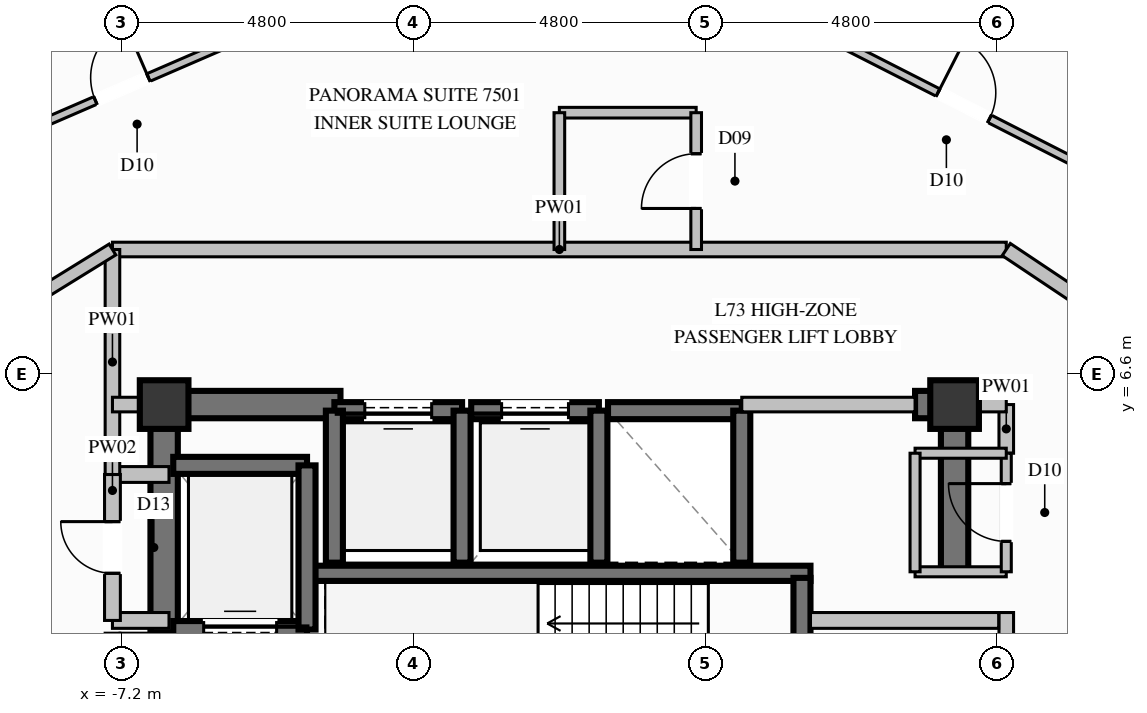
"""IFC4 building model, lengths in metres.
Left out: names, types, materials, properties, quantities, classifications, styles, units other than length and angle.
Written with IfcOpenShell. Run it as: python <this file> out.ifc"""

import sys

from ifc_helpers import new_model, si_unit, direction, frame, frame_2d, origin, origin_2d, place, context, subcontext, project, spatial, rectangle, extrude, element, fill, save


model = new_model("IFC4")
c1 = context("Model", 3, precision=1e-05, world=origin(), true_north=direction((0.0, 1.0)))
c2 = subcontext(c1, "Body", "Model", "MODEL_VIEW")
j1 = project(units=[si_unit("LENGTHUNIT", "METRE"), si_unit("PLANEANGLEUNIT", "RADIAN")], contexts=[c1])
p1 = place(None, origin())
s1 = spatial("IfcSite", under=j1, at=p1, CompositionType="ELEMENT")
p2 = place(p1, origin())
s2 = spatial("IfcBuilding", under=s1, at=p2, CompositionType="ELEMENT")
p3 = place(p2, frame((0.0, 0.0, 282.0)))
s3 = spatial("IfcBuildingStorey", under=s2, at=p3, CompositionType="ELEMENT", Elevation=282.0)
for number, where, z_axis, x_axis in (
    (1, (6.5, 6.1, 0.0), (0.0, 0.0, 1.0), (1.0, 0.0, 0.0)),
    (2, (-6.5, 6.1, 0.0), (0.0, 0.0, 1.0), (1.0, 0.0, 0.0)),
):
    element("IfcColumn", number, at=place(p3, frame(where, z_axis=z_axis, x_axis=x_axis)), inside=s3, PredefinedType="COLUMN", context=c2, shape_type="SweptSolid", body=[
        extrude(rectangle(XDim=0.8, YDim=0.8, at=origin_2d()), origin(), (0.0, 0.0, 1.0), 3.8),
    ])
p4 = place(p3, frame((-4.13, 3.325, 0.0), z_axis=(0.0, 0.0, 1.0), x_axis=(1.0, 0.0, 0.0)))
e3 = element("IfcWall", 3, at=p4, inside=s3, PredefinedType="SOLIDWALL", context=c2, shape_type="SweptSolid", body=[
    extrude(rectangle(XDim=8.26, YDim=0.25, at=frame_2d((4.13, 0.0))), origin(), (0.0, 0.0, 1.0), 3.8),
])
p5 = place(p3, frame((-6.275, 6.1, 0.0), z_axis=(0.0, 0.0, 1.0), x_axis=(1.0, 0.0, 0.0)))
e4 = element("IfcWall", 4, at=p5, inside=s3, PredefinedType="SHEAR", context=c2, shape_type="SweptSolid", body=[
    extrude(rectangle(XDim=2.675, YDim=0.45, at=frame_2d((1.337, 0.0))), origin(), (0.0, 0.0, 1.0), 3.8),
])
p6 = place(p3, frame((5.85, 6.1, 0.0), z_axis=(0.0, 0.0, 1.0), x_axis=(1.0, 0.0, 0.0)))
e5 = element("IfcWall", 5, at=p6, inside=s3, PredefinedType="SHEAR", context=c2, shape_type="SweptSolid", body=[
    extrude(rectangle(XDim=0.425, YDim=0.45, at=frame_2d((0.212, 0.0))), origin(), (0.0, 0.0, 1.0), 3.8),
])
p7 = place(p3, frame((-6.5, 2.35, 0.0), z_axis=(0.0, 0.0, 1.0), x_axis=(0.0, 1.0, 0.0)))
e6 = element("IfcWall", 6, at=p7, inside=s3, PredefinedType="SHEAR", context=c2, shape_type="SweptSolid", body=[
    extrude(rectangle(XDim=3.975, YDim=0.45, at=frame_2d((1.987, 0.0))), origin(), (0.0, 0.0, 1.0), 3.8),
])
p8 = place(p3, frame((6.5, 3.35, 0.0), z_axis=(0.0, 0.0, 1.0), x_axis=(0.0, 1.0, 0.0)))
e7 = element("IfcWall", 7, at=p8, inside=s3, PredefinedType="SHEAR", context=c2, shape_type="SweptSolid", body=[
    extrude(rectangle(XDim=2.975, YDim=0.45, at=frame_2d((1.487, 0.0))), origin(), (0.0, 0.0, 1.0), 3.8),
])
p9 = place(p3, frame((-1.6, 6.0, 0.0), z_axis=(0.0, 0.0, 1.0), x_axis=(-1.0, 0.0, 0.0)))
e8 = element("IfcWall", 8, at=p9, inside=s3, PredefinedType="SOLIDWALL", context=c2, shape_type="SweptSolid", body=[
    extrude(rectangle(XDim=2.1, YDim=0.28, at=frame_2d((1.05, 0.0))), origin(), (0.0, 0.0, 1.0), 3.57),
])
p10 = place(p9, frame((0.5, 0.0, 0.0)))
e9 = element("IfcOpeningElement", 9, at=p10, cuts=e8, PredefinedType="OPENING", context=c2, shape_type="SweptSolid", body=[
    extrude(rectangle(XDim=1.1, YDim=2.2, at=frame_2d((0.55, 1.1))), frame((0.0, 0.15, 0.0), z_axis=(0.0, -1.0, 0.0), x_axis=(1.0, 0.0, 0.0)), (0.0, 0.0, 1.0), 0.3),
])
for number, where, z_axis, x_axis in (
    (10, (-3.7, 6.0, 0.0), (0.0, 0.0, 1.0), (0.0, -1.0, 0.0)),
    (11, (-1.6, 3.5, 0.0), (0.0, 0.0, 1.0), (0.0, 1.0, 0.0)),
):
    element("IfcWall", number, at=place(p3, frame(where, z_axis=z_axis, x_axis=x_axis)), inside=s3, PredefinedType="SOLIDWALL", context=c2, shape_type="SweptSolid", body=[
        extrude(rectangle(XDim=2.5, YDim=0.28, at=frame_2d((1.25, 0.0))), origin(), (0.0, 0.0, 1.0), 3.57),
    ])
p11 = place(p3, frame((0.65, 6.0, 0.0), z_axis=(0.0, 0.0, 1.0), x_axis=(-1.0, 0.0, 0.0)))
e12 = element("IfcWall", 12, at=p11, inside=s3, PredefinedType="SOLIDWALL", context=c2, shape_type="SweptSolid", body=[
    extrude(rectangle(XDim=2.1, YDim=0.28, at=frame_2d((1.05, 0.0))), origin(), (0.0, 0.0, 1.0), 3.57),
])
p12 = place(p11, frame((0.5, 0.0, 0.0)))
e13 = element("IfcOpeningElement", 13, at=p12, cuts=e12, PredefinedType="OPENING", context=c2, shape_type="SweptSolid", body=[
    extrude(rectangle(XDim=1.1, YDim=2.2, at=frame_2d((0.55, 1.1))), frame((0.0, 0.15, 0.0), z_axis=(0.0, -1.0, 0.0), x_axis=(1.0, 0.0, 0.0)), (0.0, 0.0, 1.0), 0.3),
])
p13 = place(p3, frame((0.65, 3.5, 0.0), z_axis=(0.0, 0.0, 1.0), x_axis=(0.0, 1.0, 0.0)))
e14 = element("IfcWall", 14, at=p13, inside=s3, PredefinedType="SOLIDWALL", context=c2, shape_type="SweptSolid", body=[
    extrude(rectangle(XDim=2.5, YDim=0.28, at=frame_2d((1.25, 0.0))), origin(), (0.0, 0.0, 1.0), 3.57),
])
p14 = place(p3, frame((3.0, 6.0, 0.0), z_axis=(0.0, 0.0, 1.0), x_axis=(-1.0, 0.0, 0.0)))
e15 = element("IfcWall", 15, at=p14, inside=s3, PredefinedType="SOLIDWALL", context=c2, shape_type="SweptSolid", body=[
    extrude(rectangle(XDim=2.2, YDim=0.28, at=frame_2d((1.1, 0.0))), origin(), (0.0, 0.0, 1.0), 3.57),
])
p15 = place(p3, frame((3.0, 3.5, 0.0), z_axis=(0.0, 0.0, 1.0), x_axis=(0.0, 1.0, 0.0)))
e16 = element("IfcWall", 16, at=p15, inside=s3, PredefinedType="SOLIDWALL", context=c2, shape_type="SweptSolid", body=[
    extrude(rectangle(XDim=2.5, YDim=0.28, at=frame_2d((1.25, 0.0))), origin(), (0.0, 0.0, 1.0), 3.57),
])
p16 = place(p3, frame((-6.35, 2.4, 0.0), z_axis=(0.0, 0.0, 1.0), x_axis=(1.0, 0.0, 0.0)))
e17 = element("IfcWall", 17, at=p16, inside=s3, PredefinedType="SOLIDWALL", context=c2, shape_type="SweptSolid", body=[
    extrude(rectangle(XDim=2.2, YDim=0.28, at=frame_2d((1.1, 0.0))), origin(), (0.0, 0.0, 1.0), 3.57),
])
p17 = place(p16, frame((0.5, 0.0, 0.0)))
e18 = element("IfcOpeningElement", 18, at=p17, cuts=e17, PredefinedType="OPENING", context=c2, shape_type="SweptSolid", body=[
    extrude(rectangle(XDim=1.2, YDim=2.2, at=frame_2d((0.6, 1.1))), frame((0.0, 0.15, 0.0), z_axis=(0.0, -1.0, 0.0), x_axis=(1.0, 0.0, 0.0)), (0.0, 0.0, 1.0), 0.3),
])
p18 = place(p3, frame((-4.15, 5.1, 0.0), z_axis=(0.0, 0.0, 1.0), x_axis=(-1.0, 0.0, 0.0)))
e19 = element("IfcWall", 19, at=p18, inside=s3, PredefinedType="SOLIDWALL", context=c2, shape_type="SweptSolid", body=[
    extrude(rectangle(XDim=2.2, YDim=0.28, at=frame_2d((1.1, 0.0))), origin(), (0.0, 0.0, 1.0), 3.57),
])
p19 = place(p3, frame((-4.15, 2.4, 0.0), z_axis=(0.0, 0.0, 1.0), x_axis=(0.0, 1.0, 0.0)))
e20 = element("IfcWall", 20, at=p19, inside=s3, PredefinedType="SOLIDWALL", context=c2, shape_type="SweptSolid", body=[
    extrude(rectangle(XDim=2.7, YDim=0.28, at=frame_2d((1.35, 0.0))), origin(), (0.0, 0.0, 1.0), 3.57),
])
p20 = place(p3, frame((3.99, -2.21, 0.0), z_axis=(0.0, 0.0, 1.0), x_axis=(0.0, 1.0, 0.0)))
e21 = element("IfcWall", 21, at=p20, inside=s3, PredefinedType="SOLIDWALL", context=c2, shape_type="SweptSolid", body=[
    extrude(rectangle(XDim=5.46, YDim=0.28, at=frame_2d((2.73, 0.0))), origin(), (0.0, 0.0, 1.0), 3.57),
])
p21 = place(p20, frame((3.323, 0.0, 0.0)))
e22 = element("IfcOpeningElement", 22, at=p21, cuts=e21, PredefinedType="OPENING", context=c2, shape_type="SweptSolid", body=[
    extrude(rectangle(XDim=1.2, YDim=2.2, at=frame_2d((0.6, 1.1))), frame((0.0, 0.15, 0.0), z_axis=(0.0, -1.0, 0.0), x_axis=(1.0, 0.0, 0.0)), (0.0, 0.0, 1.0), 0.3),
])
p22 = place(p3, frame((7.35, -2.34, 0.0), z_axis=(0.0, 0.0, 1.0), x_axis=(0.0, 1.0, 0.0)))
e23 = element("IfcWall", 23, at=p22, inside=s3, PredefinedType="PARTITIONING", context=c2, shape_type="SweptSolid", body=[
    extrude(rectangle(XDim=5.02, YDim=0.24, at=frame_2d((2.51, 0.0))), origin(), (0.0, 0.0, 1.0), 2.655),
])
p23 = place(p22, frame((2.515, 0.0, 0.0)))
e24 = element("IfcOpeningElement", 24, at=p23, cuts=e23, PredefinedType="OPENING", context=c2, shape_type="SweptSolid", body=[
    extrude(rectangle(XDim=1.15, YDim=2.2, at=frame_2d((0.575, 1.1))), frame((0.0, 0.13, 0.0), z_axis=(0.0, -1.0, 0.0), x_axis=(1.0, 0.0, 0.0)), (0.0, 0.0, 1.0), 0.26),
])
p24 = place(p3, frame((4.13, 2.55, 0.0), z_axis=(0.0, 0.0, 1.0), x_axis=(1.0, 0.0, 0.0)))
e25 = element("IfcWall", 25, at=p24, inside=s3, PredefinedType="PARTITIONING", context=c2, shape_type="SweptSolid", body=[
    extrude(rectangle(XDim=3.095, YDim=0.26, at=frame_2d((1.548, 0.0))), origin(), (0.0, 0.0, 1.0), 3.57),
])
for number, where, z_axis, x_axis in (
    (26, (-7.35, 4.95, 0.0), (0.0, 0.0, 1.0), (1.0, 0.0, 0.0)),
    (27, (-7.35, 2.55, 0.0), (0.0, 0.0, 1.0), (1.0, 0.0, 0.0)),
):
    element("IfcWall", number, at=place(p3, frame(where, z_axis=z_axis, x_axis=x_axis)), inside=s3, PredefinedType="PARTITIONING", context=c2, shape_type="SweptSolid", body=[
        extrude(rectangle(XDim=0.93, YDim=0.26, at=frame_2d((0.465, 0.0))), origin(), (0.0, 0.0, 1.0), 3.57),
    ])
p25 = place(p3, frame((-7.35, 2.55, 0.0), z_axis=(0.0, 0.0, 1.0), x_axis=(0.0, 1.0, 0.0)))
e28 = element("IfcWall", 28, at=p25, inside=s3, PredefinedType="PARTITIONING", context=c2, shape_type="SweptSolid", body=[
    extrude(rectangle(XDim=2.4, YDim=0.26, at=frame_2d((1.2, 0.0))), origin(), (0.0, 0.0, 1.0), 2.655),
])
p26 = place(p25, frame((0.775, 0.0, 0.0)))
e29 = element("IfcOpeningElement", 29, at=p26, cuts=e28, PredefinedType="OPENING", context=c2, shape_type="SweptSolid", body=[
    extrude(rectangle(XDim=0.85, YDim=2.05, at=frame_2d((0.425, 1.025))), frame((0.0, 0.14, 0.0), z_axis=(0.0, -1.0, 0.0), x_axis=(1.0, 0.0, 0.0)), (0.0, 0.0, 1.0), 0.28),
])
p27 = place(p3, frame((-7.35, 8.65, 0.0), z_axis=(0.0, 0.0, 1.0), x_axis=(1.0, 0.0, 0.0)))
e30 = element("IfcWall", 30, at=p27, inside=s3, PredefinedType="PARTITIONING", context=c2, shape_type="SweptSolid", body=[
    extrude(rectangle(XDim=14.7, YDim=0.24, at=frame_2d((7.35, 0.0))), origin(), (0.0, 0.0, 1.0), 3.57),
])
p28 = place(p3, frame((3.0, 6.1, 0.0), z_axis=(0.0, 0.0, 1.0), x_axis=(1.0, 0.0, 0.0)))
e31 = element("IfcWall", 31, at=p28, inside=s3, PredefinedType="PARTITIONING", context=c2, shape_type="SweptSolid", body=[
    extrude(rectangle(XDim=2.85, YDim=0.24, at=frame_2d((1.425, 0.0))), origin(), (0.0, 0.0, 1.0), 2.655),
])
p29 = place(p3, frame((7.35, 5.3, 0.0), z_axis=(0.0, 0.0, 1.0), x_axis=(0.0, 1.0, 0.0)))
e32 = element("IfcWall", 32, at=p29, inside=s3, PredefinedType="PARTITIONING", context=c2, shape_type="SweptSolid", body=[
    extrude(rectangle(XDim=0.8, YDim=0.24, at=frame_2d((0.4, 0.0))), origin(), (0.0, 0.0, 1.0), 2.655),
])
p30 = place(p3, frame((6.5, 6.1, 0.0), z_axis=(0.0, 0.0, 1.0), x_axis=(1.0, 0.0, 0.0)))
e33 = element("IfcWall", 33, at=p30, inside=s3, PredefinedType="PARTITIONING", context=c2, shape_type="SweptSolid", body=[
    extrude(rectangle(XDim=0.85, YDim=0.24, at=frame_2d((0.425, 0.0))), origin(), (0.0, 0.0, 1.0), 3.085),
])
p31 = place(p3, frame((-7.35, 4.95, 0.0), z_axis=(0.0, 0.0, 1.0), x_axis=(0.0, 1.0, 0.0)))
e34 = element("IfcWall", 34, at=p31, inside=s3, PredefinedType="PARTITIONING", context=c2, shape_type="SweptSolid", body=[
    extrude(rectangle(XDim=3.7, YDim=0.24, at=frame_2d((1.85, 0.0))), origin(), (0.0, 0.0, 1.0), 2.655),
])
p32 = place(p3, frame((-7.35, 6.1, 0.0), z_axis=(0.0, 0.0, 1.0), x_axis=(1.0, 0.0, 0.0)))
e35 = element("IfcWall", 35, at=p32, inside=s3, PredefinedType="PARTITIONING", context=c2, shape_type="SweptSolid", body=[
    extrude(rectangle(XDim=0.85, YDim=0.24, at=frame_2d((0.425, 0.0))), origin(), (0.0, 0.0, 1.0), 3.085),
])
p33 = place(p3, frame((5.85, 3.35, 0.0), z_axis=(0.0, 0.0, 1.0), x_axis=(1.0, 0.0, 0.0)))
e36 = element("IfcWall", 36, at=p33, inside=s3, PredefinedType="PARTITIONING", context=c2, shape_type="SweptSolid", body=[
    extrude(rectangle(XDim=1.5, YDim=0.165, at=frame_2d((0.75, 0.0))), origin(), (0.0, 0.0, 1.0), 3.57),
])
p34 = place(p3, frame((7.35, 3.35, 0.0), z_axis=(0.0, 0.0, 1.0), x_axis=(0.0, 1.0, 0.0)))
e37 = element("IfcWall", 37, at=p34, inside=s3, PredefinedType="PARTITIONING", context=c2, shape_type="SweptSolid", body=[
    extrude(rectangle(XDim=1.95, YDim=0.165, at=frame_2d((0.975, 0.0))), origin(), (0.0, 0.0, 1.0), 3.57),
])
p35 = place(p34, frame((0.5, 0.0, 0.0)))
e38 = element("IfcOpeningElement", 38, at=p35, cuts=e37, PredefinedType="OPENING", context=c2, shape_type="SweptSolid", body=[
    extrude(rectangle(XDim=0.95, YDim=2.1, at=frame_2d((0.475, 1.05))), frame((0.0, 0.093, 0.0), z_axis=(0.0, -1.0, 0.0), x_axis=(1.0, 0.0, 0.0)), (0.0, 0.0, 1.0), 0.185),
])
p36 = place(p3, frame((7.35, 5.3, 0.0), z_axis=(0.0, 0.0, 1.0), x_axis=(-1.0, 0.0, 0.0)))
e39 = element("IfcWall", 39, at=p36, inside=s3, PredefinedType="PARTITIONING", context=c2, shape_type="SweptSolid", body=[
    extrude(rectangle(XDim=1.5, YDim=0.165, at=frame_2d((0.75, 0.0))), origin(), (0.0, 0.0, 1.0), 2.655),
])
p37 = place(p3, frame((5.85, 5.3, 0.0), z_axis=(0.0, 0.0, 1.0), x_axis=(0.0, -1.0, 0.0)))
e40 = element("IfcWall", 40, at=p37, inside=s3, PredefinedType="PARTITIONING", context=c2, shape_type="SweptSolid", body=[
    extrude(rectangle(XDim=1.95, YDim=0.165, at=frame_2d((0.975, 0.0))), origin(), (0.0, 0.0, 1.0), 2.655),
])
p38 = place(p3, frame((0.0, 10.9, 0.0), z_axis=(0.0, 0.0, 1.0), x_axis=(1.0, 0.0, 0.0)))
e41 = element("IfcWall", 41, at=p38, inside=s3, PredefinedType="PLUMBINGWALL", context=c2, shape_type="SweptSolid", body=[
    extrude(rectangle(XDim=2.25, YDim=0.175, at=frame_2d((1.125, 0.0))), origin(), (0.0, 0.0, 1.0), 3.252),
])
p39 = place(p3, frame((0.0, 10.9, 0.0), z_axis=(0.0, 0.0, 1.0), x_axis=(0.0, -1.0, 0.0)))
e42 = element("IfcWall", 42, at=p39, inside=s3, PredefinedType="PLUMBINGWALL", context=c2, shape_type="SweptSolid", body=[
    extrude(rectangle(XDim=2.25, YDim=0.175, at=frame_2d((1.125, 0.0))), origin(), (0.0, 0.0, 1.0), 3.57),
])
p40 = place(p3, frame((2.25, 8.65, 0.0), z_axis=(0.0, 0.0, 1.0), x_axis=(0.0, 1.0, 0.0)))
e43 = element("IfcWall", 43, at=p40, inside=s3, PredefinedType="PLUMBINGWALL", context=c2, shape_type="SweptSolid", body=[
    extrude(rectangle(XDim=2.25, YDim=0.175, at=frame_2d((1.125, 0.0))), origin(), (0.0, 0.0, 1.0), 3.57),
])
p41 = place(p40, frame((0.675, 0.0, 0.0)))
e44 = element("IfcOpeningElement", 44, at=p41, cuts=e43, PredefinedType="OPENING", context=c2, shape_type="SweptSolid", body=[
    extrude(rectangle(XDim=0.9, YDim=2.1, at=frame_2d((0.45, 1.05))), frame((0.0, 0.098, 0.0), z_axis=(0.0, -1.0, 0.0), x_axis=(1.0, 0.0, 0.0)), (0.0, 0.0, 1.0), 0.195),
])
p42 = place(p3, frame((-11.278, 6.225, 0.0), z_axis=(0.0, 0.0, 1.0), x_axis=(0.85092385233, 0.525289060933, 0.0)))
e45 = element("IfcWall", 45, at=p42, inside=s3, PredefinedType="PARTITIONING", context=c2, shape_type="SweptSolid", body=[
    extrude(rectangle(XDim=4.616, YDim=0.21, at=frame_2d((2.308, 0.0))), origin(), (0.0, 0.0, 1.0), 3.57),
])
p43 = place(p3, frame((7.35, 8.65, 0.0), z_axis=(0.0, 0.0, 1.0), x_axis=(0.831395547998, -0.555681062094, 0.0)))
e46 = element("IfcWall", 46, at=p43, inside=s3, PredefinedType="PARTITIONING", context=c2, shape_type="SweptSolid", body=[
    extrude(rectangle(XDim=4.364, YDim=0.24, at=frame_2d((2.182, 0.0))), origin(), (0.0, 0.0, 1.0), 3.57),
])
p44 = place(p43, frame((1.632, 0.0, 0.0)))
e47 = element("IfcOpeningElement", 47, at=p44, cuts=e46, PredefinedType="OPENING", context=c2, shape_type="SweptSolid", body=[
    extrude(rectangle(XDim=1.1, YDim=2.3, at=frame_2d((0.55, 1.15))), frame((0.0, 0.13, 0.0), z_axis=(0.0, -1.0, 0.0), x_axis=(1.0, 0.0, 0.0)), (0.0, 0.0, 1.0), 0.26),
])
p45 = place(p3, frame((0.0, 14.403, 0.0), z_axis=(0.0, 0.0, 1.0), x_axis=(0.89107593803, -0.45385424165, 0.0)))
e48 = element("IfcWall", 48, at=p45, inside=s3, PredefinedType="PARTITIONING", context=c2, shape_type="SweptSolid", body=[
    extrude(rectangle(XDim=14.928, YDim=0.135, at=frame_2d((7.464, 0.0))), origin(), (0.0, 0.0, 1.0), 3.085),
])
p46 = place(p45, frame((6.989, 0.0, 0.0)))
e49 = element("IfcOpeningElement", 49, at=p46, cuts=e48, PredefinedType="OPENING", context=c2, shape_type="SweptSolid", body=[
    extrude(rectangle(XDim=0.95, YDim=2.1, at=frame_2d((0.475, 1.05))), frame((0.0, 0.078, 0.0), z_axis=(0.0, -1.0, 0.0), x_axis=(1.0, 0.0, 0.0)), (0.0, 0.0, 1.0), 0.155),
])
p47 = place(p3, frame((-14.39, 8.176, 0.0), z_axis=(0.0, 0.0, 1.0), x_axis=(0.917754899872, 0.397147257022, 0.0)))
e50 = element("IfcWall", 50, at=p47, inside=s3, PredefinedType="PARTITIONING", context=c2, shape_type="SweptSolid", body=[
    extrude(rectangle(XDim=15.679, YDim=0.135, at=frame_2d((7.84, 0.0))), origin(), (0.0, 0.0, 1.0), 3.57),
])
p48 = place(p47, frame((7.365, 0.0, 0.0)))
e51 = element("IfcOpeningElement", 51, at=p48, cuts=e50, PredefinedType="OPENING", context=c2, shape_type="SweptSolid", body=[
    extrude(rectangle(XDim=0.95, YDim=2.1, at=frame_2d((0.475, 1.05))), frame((0.0, 0.078, 0.0), z_axis=(0.0, -1.0, 0.0), x_axis=(1.0, 0.0, 0.0)), (0.0, 0.0, 1.0), 0.155),
])
p49 = place(p10, origin())
e52 = element("IfcDoor", 52, at=p49, inside=s3, OperationType="SLIDING_TO_LEFT", PredefinedType="DOOR", context=c2, shape_type="SweptSolid", body=[
    extrude(rectangle(XDim=1.1, YDim=2.2, at=frame_2d((0.55, 1.1))), frame((0.0, 0.025, 0.0), z_axis=(0.0, -1.0, 0.0), x_axis=(1.0, 0.0, 0.0)), (0.0, 0.0, 1.0), 0.05),
])
fill(e9, e52)
p50 = place(p12, origin())
e53 = element("IfcDoor", 53, at=p50, inside=s3, OperationType="SLIDING_TO_LEFT", PredefinedType="DOOR", context=c2, shape_type="SweptSolid", body=[
    extrude(rectangle(XDim=1.1, YDim=2.2, at=frame_2d((0.55, 1.1))), frame((0.0, 0.025, 0.0), z_axis=(0.0, -1.0, 0.0), x_axis=(1.0, 0.0, 0.0)), (0.0, 0.0, 1.0), 0.05),
])
fill(e13, e53)
p51 = place(p17, origin())
e54 = element("IfcDoor", 54, at=p51, inside=s3, OperationType="SLIDING_TO_LEFT", PredefinedType="DOOR", context=c2, shape_type="SweptSolid", body=[
    extrude(rectangle(XDim=1.2, YDim=2.2, at=frame_2d((0.6, 1.1))), frame((0.0, 0.025, 0.0), z_axis=(0.0, -1.0, 0.0), x_axis=(1.0, 0.0, 0.0)), (0.0, 0.0, 1.0), 0.05),
])
fill(e18, e54)
p52 = place(p26, origin())
e55 = element("IfcDoor", 55, at=p52, inside=s3, OperationType="SINGLE_SWING_RIGHT", PredefinedType="DOOR", context=c2, shape_type="SweptSolid", body=[
    extrude(rectangle(XDim=0.85, YDim=2.05, at=frame_2d((0.425, 1.025))), frame((0.0, 0.025, 0.0), z_axis=(0.0, -1.0, 0.0), x_axis=(1.0, 0.0, 0.0)), (0.0, 0.0, 1.0), 0.05),
])
fill(e29, e55)
p53 = place(p35, origin())
e56 = element("IfcDoor", 56, at=p53, inside=s3, OperationType="SINGLE_SWING_RIGHT", PredefinedType="DOOR", context=c2, shape_type="SweptSolid", body=[
    extrude(rectangle(XDim=0.95, YDim=2.1, at=frame_2d((0.475, 1.05))), frame((0.0, 0.025, 0.0), z_axis=(0.0, -1.0, 0.0), x_axis=(1.0, 0.0, 0.0)), (0.0, 0.0, 1.0), 0.05),
])
fill(e38, e56)
p54 = place(p41, origin())
e57 = element("IfcDoor", 57, at=p54, inside=s3, OperationType="SINGLE_SWING_LEFT", PredefinedType="DOOR", context=c2, shape_type="SweptSolid", body=[
    extrude(rectangle(XDim=0.9, YDim=2.1, at=frame_2d((0.45, 1.05))), frame((0.0, 0.025, 0.0), z_axis=(0.0, -1.0, 0.0), x_axis=(1.0, 0.0, 0.0)), (0.0, 0.0, 1.0), 0.05),
])
fill(e44, e57)
p55 = place(p46, origin())
e58 = element("IfcDoor", 58, at=p55, inside=s3, OperationType="SINGLE_SWING_LEFT", PredefinedType="DOOR", context=c2, shape_type="SweptSolid", body=[
    extrude(rectangle(XDim=0.95, YDim=2.1, at=frame_2d((0.475, 1.05))), frame((0.0, 0.025, 0.0), z_axis=(0.0, -1.0, 0.0), x_axis=(1.0, 0.0, 0.0)), (0.0, 0.0, 1.0), 0.05),
])
fill(e49, e58)
p56 = place(p48, origin())
e59 = element("IfcDoor", 59, at=p56, inside=s3, OperationType="SINGLE_SWING_RIGHT", PredefinedType="DOOR", context=c2, shape_type="SweptSolid", body=[
    extrude(rectangle(XDim=0.95, YDim=2.1, at=frame_2d((0.475, 1.05))), frame((0.0, 0.025, 0.0), z_axis=(0.0, -1.0, 0.0), x_axis=(1.0, 0.0, 0.0)), (0.0, 0.0, 1.0), 0.05),
])
fill(e51, e59)
save(model, sys.argv[1])
